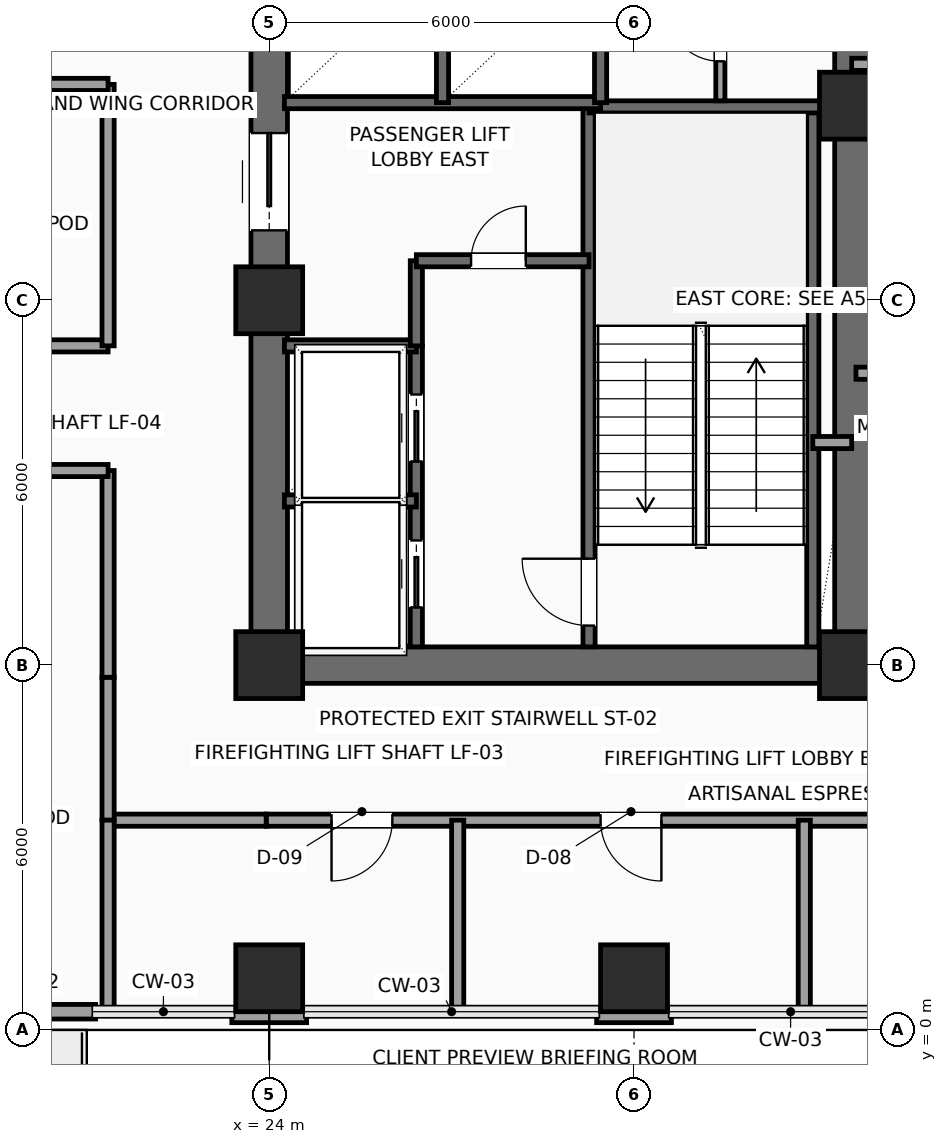
"""IFC4 building model, lengths in metres.
Left out: names, types, materials, properties, quantities, classifications, styles, units other than length and angle.
Written with IfcOpenShell. Run it as: python <this file> out.ifc"""

import sys

from ifc_helpers import new_model, si_unit, direction, frame, frame_2d, origin, origin_2d, place, context, subcontext, project, spatial, rectangle, extrude, element, fill, save


model = new_model("IFC4")
c1 = context("Model", 3, precision=1e-05, world=origin(), true_north=direction((0.0, 1.0)))
c2 = subcontext(c1, "Body", "Model", "MODEL_VIEW")
j1 = project(units=[si_unit("LENGTHUNIT", "METRE"), si_unit("PLANEANGLEUNIT", "RADIAN")], contexts=[c1])
p1 = place(None, origin())
s1 = spatial("IfcSite", under=j1, at=p1, CompositionType="ELEMENT")
p2 = place(p1, origin())
s2 = spatial("IfcBuilding", under=s1, at=p2, CompositionType="ELEMENT")
p3 = place(p2, frame((0.0, 0.0, 115.65)))
s3 = spatial("IfcBuildingStorey", under=s2, at=p3, CompositionType="ELEMENT", Elevation=115.65)
for number, where, z_axis, x_axis in (
    (1, (24.0, 6.0, 0.0), (0.0, 0.0, 1.0), (1.0, 0.0, 0.0)),
    (2, (24.0, 12.0, 0.0), (0.0, 0.0, 1.0), (1.0, 0.0, 0.0)),
    (3, (33.6, 6.0, 0.0), (0.0, 0.0, 1.0), (1.0, 0.0, 0.0)),
    (4, (33.6, 15.2, 0.0), (0.0, 0.0, 1.0), (1.0, 0.0, 0.0)),
    (5, (24.0, 0.85, 0.0), (0.0, 0.0, 1.0), (1.0, 0.0, 0.0)),
    (6, (30.0, 0.85, 0.0), (0.0, 0.0, 1.0), (1.0, 0.0, 0.0)),
):
    element("IfcColumn", number, at=place(p3, frame(where, z_axis=z_axis, x_axis=x_axis)), inside=s3, PredefinedType="COLUMN", context=c2, shape_type="SweptSolid", body=[
        extrude(rectangle(XDim=1.1, YDim=1.1, at=origin_2d()), origin(), (0.0, 0.0, 1.0), 3.75),
    ])
p4 = place(p3, frame((21.145, 0.3, 0.0), z_axis=(0.0, 0.0, 1.0), x_axis=(-1.0, 0.0, 0.0)))
e7 = element("IfcWall", 7, at=p4, inside=s3, PredefinedType="SOLIDWALL", context=c2, shape_type="SweptSolid", body=[
    extrude(rectangle(XDim=9.29, YDim=0.24, at=frame_2d((4.645, 0.0))), origin(), (0.0, 0.0, 1.0), 3.525),
])
p5 = place(p4, frame((3.945, 0.0, 0.0)))
e8 = element("IfcOpeningElement", 8, at=p5, cuts=e7, PredefinedType="OPENING", context=c2, shape_type="SweptSolid", body=[
    extrude(rectangle(XDim=1.05, YDim=2.2, at=frame_2d((0.525, 1.1))), frame((0.0, 0.13, 0.0), z_axis=(0.0, -1.0, 0.0), x_axis=(1.0, 0.0, 0.0)), (0.0, 0.0, 1.0), 0.26),
])
p6 = place(p4, frame((6.5, 0.0, 0.85)))
e9 = element("IfcOpeningElement", 9, at=p6, cuts=e7, PredefinedType="OPENING", context=c2, shape_type="SweptSolid", body=[
    extrude(rectangle(XDim=1.8, YDim=2.1, at=frame_2d((0.9, 1.05))), frame((0.0, 0.13, 0.0), z_axis=(0.0, -1.0, 0.0), x_axis=(1.0, 0.0, 0.0)), (0.0, 0.0, 1.0), 0.26),
])
for number, where, z_axis, x_axis in (
    (10, (30.615, 0.24, 0.0), (0.0, 0.0, 1.0), (-1.0, 0.0, 0.0)),
    (11, (24.615, 0.24, 0.0), (0.0, 0.0, 1.0), (-1.0, 0.0, 0.0)),
):
    element("IfcWall", number, at=place(p3, frame(where, z_axis=z_axis, x_axis=x_axis)), inside=s3, PredefinedType="SOLIDWALL", context=c2, shape_type="SweptSolid", body=[
        extrude(rectangle(XDim=1.23, YDim=0.24, at=frame_2d((0.615, 0.0))), origin(), (0.0, 0.0, 1.0), 3.525),
    ])
p7 = place(p3, frame((24.0, 6.0, 0.0), z_axis=(0.0, 0.0, 1.0), x_axis=(1.0, 0.0, 0.0)))
e12 = element("IfcWall", 12, at=p7, inside=s3, PredefinedType="SHEAR", context=c2, shape_type="SweptSolid", body=[
    extrude(rectangle(XDim=9.6, YDim=0.6, at=frame_2d((4.8, 0.0))), origin(), (0.0, 0.0, 1.0), 3.525),
])
p8 = place(p3, frame((24.0, 6.0, 0.0), z_axis=(0.0, 0.0, 1.0), x_axis=(0.0, 1.0, 0.0)))
e13 = element("IfcWall", 13, at=p8, inside=s3, PredefinedType="SHEAR", context=c2, shape_type="SweptSolid", body=[
    extrude(rectangle(XDim=12.0, YDim=0.6, at=frame_2d((6.0, 0.0))), origin(), (0.0, 0.0, 1.0), 3.525),
])
p9 = place(p8, frame((7.15, 0.0, 0.0)))
e14 = element("IfcOpeningElement", 14, at=p9, cuts=e13, PredefinedType="OPENING", context=c2, shape_type="SweptSolid", body=[
    extrude(rectangle(XDim=1.6, YDim=2.3, at=frame_2d((0.8, 1.15))), frame((0.0, 0.31, 0.0), z_axis=(0.0, -1.0, 0.0), x_axis=(1.0, 0.0, 0.0)), (0.0, 0.0, 1.0), 0.62),
])
p10 = place(p3, frame((33.6, 6.0, 0.0), z_axis=(0.0, 0.0, 1.0), x_axis=(0.0, 1.0, 0.0)))
e15 = element("IfcWall", 15, at=p10, inside=s3, PredefinedType="SHEAR", context=c2, shape_type="SweptSolid", body=[
    extrude(rectangle(XDim=12.0, YDim=0.6, at=frame_2d((6.0, 0.0))), origin(), (0.0, 0.0, 1.0), 3.525),
])
p11 = place(p10, frame((10.15, 0.0, 0.0)))
e16 = element("IfcOpeningElement", 16, at=p11, cuts=e15, PredefinedType="OPENING", context=c2, shape_type="SweptSolid", body=[
    extrude(rectangle(XDim=0.9, YDim=2.15, at=frame_2d((0.45, 1.075))), frame((0.0, 0.31, 0.0), z_axis=(0.0, -1.0, 0.0), x_axis=(1.0, 0.0, 0.0)), (0.0, 0.0, 1.0), 0.62),
])
p12 = place(p3, frame((29.26, 6.3, 0.0), z_axis=(0.0, 0.0, 1.0), x_axis=(0.0, 1.0, 0.0)))
e17 = element("IfcWall", 17, at=p12, inside=s3, PredefinedType="SHEAR", context=c2, shape_type="SweptSolid", body=[
    extrude(rectangle(XDim=8.88, YDim=0.2, at=frame_2d((4.44, 0.0))), origin(), (0.0, 0.0, 1.0), 3.525),
])
p13 = place(p12, frame((0.35, 0.0, 0.0)))
e18 = element("IfcOpeningElement", 18, at=p13, cuts=e17, PredefinedType="OPENING", context=c2, shape_type="SweptSolid", body=[
    extrude(rectangle(XDim=1.1, YDim=2.2, at=frame_2d((0.55, 1.1))), frame((0.0, 0.11, 0.0), z_axis=(0.0, -1.0, 0.0), x_axis=(1.0, 0.0, 0.0)), (0.0, 0.0, 1.0), 0.22),
])
p14 = place(p3, frame((32.94, 6.3, 0.0), z_axis=(0.0, 0.0, 1.0), x_axis=(0.0, 1.0, 0.0)))
e19 = element("IfcWall", 19, at=p14, inside=s3, PredefinedType="SHEAR", context=c2, shape_type="SweptSolid", body=[
    extrude(rectangle(XDim=8.88, YDim=0.2, at=frame_2d((4.44, 0.0))), origin(), (0.0, 0.0, 1.0), 3.525),
])
p15 = place(p3, frame((29.26, 15.18, 0.0), z_axis=(0.0, 0.0, 1.0), x_axis=(1.0, 0.0, 0.0)))
e20 = element("IfcWall", 20, at=p15, inside=s3, PredefinedType="SHEAR", context=c2, shape_type="SweptSolid", body=[
    extrude(rectangle(XDim=4.04, YDim=0.2, at=frame_2d((2.02, 0.0))), origin(), (0.0, 0.0, 1.0), 3.525),
])
p16 = place(p3, frame((26.42, 6.3, 0.0), z_axis=(0.0, 0.0, 1.0), x_axis=(0.0, 1.0, 0.0)))
e21 = element("IfcWall", 21, at=p16, inside=s3, PredefinedType="SHEAR", context=c2, shape_type="SweptSolid", body=[
    extrude(rectangle(XDim=4.95, YDim=0.2, at=frame_2d((2.475, 0.0))), origin(), (0.0, 0.0, 1.0), 3.525),
])
p17 = place(p16, frame((0.65, 0.0, 0.0)))
e22 = element("IfcOpeningElement", 22, at=p17, cuts=e21, PredefinedType="OPENING", context=c2, shape_type="SweptSolid", body=[
    extrude(rectangle(XDim=1.1, YDim=2.2, at=frame_2d((0.55, 1.1))), frame((0.0, 0.11, 0.0), z_axis=(0.0, -1.0, 0.0), x_axis=(1.0, 0.0, 0.0)), (0.0, 0.0, 1.0), 0.22),
])
p18 = place(p16, frame((3.05, 0.0, 0.0)))
e23 = element("IfcOpeningElement", 23, at=p18, cuts=e21, PredefinedType="OPENING", context=c2, shape_type="SweptSolid", body=[
    extrude(rectangle(XDim=1.1, YDim=2.2, at=frame_2d((0.55, 1.1))), frame((0.0, 0.11, 0.0), z_axis=(0.0, -1.0, 0.0), x_axis=(1.0, 0.0, 0.0)), (0.0, 0.0, 1.0), 0.22),
])
for number, where, z_axis, x_axis in (
    (24, (24.25, 8.7, 0.0), (0.0, 0.0, 1.0), (1.0, 0.0, 0.0)),
    (25, (24.25, 11.25, 0.0), (0.0, 0.0, 1.0), (1.0, 0.0, 0.0)),
):
    element("IfcWall", number, at=place(p3, frame(where, z_axis=z_axis, x_axis=x_axis)), inside=s3, PredefinedType="SHEAR", context=c2, shape_type="SweptSolid", body=[
        extrude(rectangle(XDim=2.17, YDim=0.2, at=frame_2d((1.085, 0.0))), origin(), (0.0, 0.0, 1.0), 3.525),
    ])
p19 = place(p3, frame((26.42, 11.25, 0.0), z_axis=(0.0, 0.0, 1.0), x_axis=(0.0, 1.0, 0.0)))
e26 = element("IfcWall", 26, at=p19, inside=s3, PredefinedType="SHEAR", context=c2, shape_type="SweptSolid", body=[
    extrude(rectangle(XDim=1.4, YDim=0.2, at=frame_2d((0.7, 0.0))), origin(), (0.0, 0.0, 1.0), 3.525),
])
p20 = place(p3, frame((26.42, 12.65, 0.0), z_axis=(0.0, 0.0, 1.0), x_axis=(1.0, 0.0, 0.0)))
e27 = element("IfcWall", 27, at=p20, inside=s3, PredefinedType="SHEAR", context=c2, shape_type="SweptSolid", body=[
    extrude(rectangle(XDim=2.84, YDim=0.2, at=frame_2d((1.42, 0.0))), origin(), (0.0, 0.0, 1.0), 3.525),
])
p21 = place(p20, frame((0.9, 0.0, 0.0)))
e28 = element("IfcOpeningElement", 28, at=p21, cuts=e27, PredefinedType="OPENING", context=c2, shape_type="SweptSolid", body=[
    extrude(rectangle(XDim=0.9, YDim=2.15, at=frame_2d((0.45, 1.075))), frame((0.0, 0.11, 0.0), z_axis=(0.0, -1.0, 0.0), x_axis=(1.0, 0.0, 0.0)), (0.0, 0.0, 1.0), 0.22),
])
p22 = place(p3, frame((32.94, 9.66, 0.0), z_axis=(0.0, 0.0, 1.0), x_axis=(1.0, 0.0, 0.0)))
e29 = element("IfcWall", 29, at=p22, inside=s3, PredefinedType="SOLIDWALL", context=c2, shape_type="SweptSolid", body=[
    extrude(rectangle(XDim=0.64, YDim=0.2, at=frame_2d((0.32, 0.0))), origin(), (0.0, 0.0, 1.0), 3.525),
])
p23 = place(p3, frame((24.25, 15.25, 0.0), z_axis=(0.0, 0.0, 1.0), x_axis=(1.0, 0.0, 0.0)))
e30 = element("IfcWall", 30, at=p23, inside=s3, PredefinedType="SHEAR", context=c2, shape_type="SweptSolid", body=[
    extrude(rectangle(XDim=5.2, YDim=0.2, at=frame_2d((2.6, 0.0))), origin(), (0.0, 0.0, 1.0), 3.525),
])
p24 = place(p3, frame((26.85, 15.25, 0.0), z_axis=(0.0, 0.0, 1.0), x_axis=(0.0, 1.0, 0.0)))
e31 = element("IfcWall", 31, at=p24, inside=s3, PredefinedType="SHEAR", context=c2, shape_type="SweptSolid", body=[
    extrude(rectangle(XDim=2.4, YDim=0.2, at=frame_2d((1.2, 0.0))), origin(), (0.0, 0.0, 1.0), 3.525),
])
p25 = place(p3, frame((29.45, 15.25, 0.0), z_axis=(0.0, 0.0, 1.0), x_axis=(0.0, 1.0, 0.0)))
e32 = element("IfcWall", 32, at=p25, inside=s3, PredefinedType="SHEAR", context=c2, shape_type="SweptSolid", body=[
    extrude(rectangle(XDim=2.45, YDim=0.2, at=frame_2d((1.225, 0.0))), origin(), (0.0, 0.0, 1.0), 3.525),
])
p26 = place(p3, frame((31.42, 15.28, 0.0), z_axis=(0.0, 0.0, 1.0), x_axis=(0.0, 1.0, 0.0)))
e33 = element("IfcWall", 33, at=p26, inside=s3, PredefinedType="PARTITIONING", context=c2, shape_type="SweptSolid", body=[
    extrude(rectangle(XDim=2.42, YDim=0.15, at=frame_2d((1.21, 0.0))), origin(), (0.0, 0.0, 1.0), 3.525),
])
p27 = place(p26, frame((0.65, 0.0, 0.0)))
e34 = element("IfcOpeningElement", 34, at=p27, cuts=e33, PredefinedType="OPENING", context=c2, shape_type="SweptSolid", body=[
    extrude(rectangle(XDim=0.9, YDim=2.15, at=frame_2d((0.45, 1.075))), frame((0.0, 0.085, 0.0), z_axis=(0.0, -1.0, 0.0), x_axis=(1.0, 0.0, 0.0)), (0.0, 0.0, 1.0), 0.17),
])
p28 = place(p3, frame((10.8, 11.25, 0.0), z_axis=(0.0, 0.0, 1.0), x_axis=(1.0, 0.0, 0.0)))
e35 = element("IfcWall", 35, at=p28, inside=s3, PredefinedType="SOLIDWALL", context=c2, shape_type="SweptSolid", body=[
    extrude(rectangle(XDim=10.55, YDim=0.2, at=frame_2d((5.275, 0.0))), origin(), (0.0, 0.0, 1.0), 3.525),
])
p29 = place(p28, frame((2.15, 0.0, 0.0)))
e36 = element("IfcOpeningElement", 36, at=p29, cuts=e35, PredefinedType="OPENING", context=c2, shape_type="SweptSolid", body=[
    extrude(rectangle(XDim=1.0, YDim=2.2, at=frame_2d((0.5, 1.1))), frame((0.0, 0.11, 0.0), z_axis=(0.0, -1.0, 0.0), x_axis=(1.0, 0.0, 0.0)), (0.0, 0.0, 1.0), 0.22),
])
p30 = place(p28, frame((7.68, 0.0, 0.0)))
e37 = element("IfcOpeningElement", 37, at=p30, cuts=e35, PredefinedType="OPENING", context=c2, shape_type="SweptSolid", body=[
    extrude(rectangle(XDim=0.9, YDim=2.1, at=frame_2d((0.45, 1.05))), frame((0.0, 0.11, 0.0), z_axis=(0.0, -1.0, 0.0), x_axis=(1.0, 0.0, 0.0)), (0.0, 0.0, 1.0), 0.22),
])
p31 = place(p3, frame((21.35, 11.25, 0.0), z_axis=(0.0, 0.0, 1.0), x_axis=(0.0, 1.0, 0.0)))
e38 = element("IfcWall", 38, at=p31, inside=s3, PredefinedType="SOLIDWALL", context=c2, shape_type="SweptSolid", body=[
    extrude(rectangle(XDim=4.3, YDim=0.2, at=frame_2d((2.15, 0.0))), origin(), (0.0, 0.0, 1.0), 3.525),
])
p32 = place(p3, frame((21.35, 15.55, 0.0), z_axis=(0.0, 0.0, 1.0), x_axis=(-1.0, 0.0, 0.0)))
e39 = element("IfcWall", 39, at=p32, inside=s3, PredefinedType="SOLIDWALL", context=c2, shape_type="SweptSolid", body=[
    extrude(rectangle(XDim=3.3, YDim=0.2, at=frame_2d((1.65, 0.0))), origin(), (0.0, 0.0, 1.0), 3.525),
])
p33 = place(p3, frame((36.15, 15.88, 0.0), z_axis=(0.0, 0.0, 1.0), x_axis=(-1.0, 0.0, 0.0)))
e40 = element("IfcWall", 40, at=p33, inside=s3, PredefinedType="SOLIDWALL", context=c2, shape_type="SweptSolid", body=[
    extrude(rectangle(XDim=2.57, YDim=0.2, at=frame_2d((1.285, 0.0))), origin(), (0.0, 0.0, 1.0), 3.525),
])
p34 = place(p3, frame((36.15, 3.45, 0.0), z_axis=(0.0, 0.0, 1.0), x_axis=(-1.0, 0.0, 0.0)))
e41 = element("IfcWall", 41, at=p34, inside=s3, PredefinedType="SOLIDWALL", context=c2, shape_type="SweptSolid", body=[
    extrude(rectangle(XDim=12.2, YDim=0.2, at=frame_2d((6.1, 0.0))), origin(), (0.0, 0.0, 1.0), 3.067),
])
p35 = place(p34, frame((10.125, 0.0, 0.0)))
e42 = element("IfcOpeningElement", 42, at=p35, cuts=e41, PredefinedType="OPENING", context=c2, shape_type="SweptSolid", body=[
    extrude(rectangle(XDim=1.0, YDim=2.2, at=frame_2d((0.5, 1.1))), frame((0.0, 0.11, 0.0), z_axis=(0.0, -1.0, 0.0), x_axis=(1.0, 0.0, 0.0)), (0.0, 0.0, 1.0), 0.22),
])
p36 = place(p34, frame((5.7, 0.0, 0.0)))
e43 = element("IfcOpeningElement", 43, at=p36, cuts=e41, PredefinedType="OPENING", context=c2, shape_type="SweptSolid", body=[
    extrude(rectangle(XDim=1.0, YDim=2.2, at=frame_2d((0.5, 1.1))), frame((0.0, 0.11, 0.0), z_axis=(0.0, -1.0, 0.0), x_axis=(1.0, 0.0, 0.0)), (0.0, 0.0, 1.0), 0.22),
])
p37 = place(p3, frame((23.95, 3.45, 0.0), z_axis=(0.0, 0.0, 1.0), x_axis=(-1.0, 0.0, 0.0)))
e44 = element("IfcWall", 44, at=p37, inside=s3, PredefinedType="SOLIDWALL", context=c2, shape_type="SweptSolid", body=[
    extrude(rectangle(XDim=2.6, YDim=0.2, at=frame_2d((1.3, 0.0))), origin(), (0.0, 0.0, 1.0), 3.067),
])
p38 = place(p3, frame((21.35, 3.45, 0.0), z_axis=(0.0, 0.0, 1.0), x_axis=(0.0, 1.0, 0.0)))
e45 = element("IfcWall", 45, at=p38, inside=s3, PredefinedType="SOLIDWALL", context=c2, shape_type="SweptSolid", body=[
    extrude(rectangle(XDim=2.35, YDim=0.2, at=frame_2d((1.175, 0.0))), origin(), (0.0, 0.0, 1.0), 3.525),
])
p39 = place(p3, frame((21.35, 5.8, 0.0), z_axis=(0.0, 0.0, 1.0), x_axis=(0.0, 1.0, 0.0)))
e46 = element("IfcWall", 46, at=p39, inside=s3, PredefinedType="SOLIDWALL", context=c2, shape_type="SweptSolid", body=[
    extrude(rectangle(XDim=3.4, YDim=0.2, at=frame_2d((1.7, 0.0))), origin(), (0.0, 0.0, 1.0), 3.525),
])
p40 = place(p3, frame((21.35, 9.2, 0.0), z_axis=(0.0, 0.0, 1.0), x_axis=(-1.0, 0.0, 0.0)))
e47 = element("IfcWall", 47, at=p40, inside=s3, PredefinedType="SOLIDWALL", context=c2, shape_type="SweptSolid", body=[
    extrude(rectangle(XDim=18.15, YDim=0.2, at=frame_2d((9.075, 0.0))), origin(), (0.0, 0.0, 1.0), 3.067),
])
p41 = place(p40, frame((16.65, 0.0, 0.0)))
e48 = element("IfcOpeningElement", 48, at=p41, cuts=e47, PredefinedType="OPENING", context=c2, shape_type="SweptSolid", body=[
    extrude(rectangle(XDim=1.0, YDim=2.2, at=frame_2d((0.5, 1.1))), frame((0.0, 0.11, 0.0), z_axis=(0.0, -1.0, 0.0), x_axis=(1.0, 0.0, 0.0)), (0.0, 0.0, 1.0), 0.22),
])
p42 = place(p40, frame((13.15, 0.0, 0.0)))
e49 = element("IfcOpeningElement", 49, at=p42, cuts=e47, PredefinedType="OPENING", context=c2, shape_type="SweptSolid", body=[
    extrude(rectangle(XDim=1.0, YDim=2.2, at=frame_2d((0.5, 1.1))), frame((0.0, 0.11, 0.0), z_axis=(0.0, -1.0, 0.0), x_axis=(1.0, 0.0, 0.0)), (0.0, 0.0, 1.0), 0.22),
])
p43 = place(p40, frame((8.15, 0.0, 0.0)))
e50 = element("IfcOpeningElement", 50, at=p43, cuts=e47, PredefinedType="OPENING", context=c2, shape_type="SweptSolid", body=[
    extrude(rectangle(XDim=1.0, YDim=2.2, at=frame_2d((0.5, 1.1))), frame((0.0, 0.11, 0.0), z_axis=(0.0, -1.0, 0.0), x_axis=(1.0, 0.0, 0.0)), (0.0, 0.0, 1.0), 0.22),
])
p44 = place(p40, frame((2.575, 0.0, 0.0)))
e51 = element("IfcOpeningElement", 51, at=p44, cuts=e47, PredefinedType="OPENING", context=c2, shape_type="SweptSolid", body=[
    extrude(rectangle(XDim=1.0, YDim=2.2, at=frame_2d((0.5, 1.1))), frame((0.0, 0.11, 0.0), z_axis=(0.0, -1.0, 0.0), x_axis=(1.0, 0.0, 0.0)), (0.0, 0.0, 1.0), 0.22),
])
for number, where, z_axis, x_axis in (
    (52, (21.35, 0.3, 0.0), (0.0, 0.0, 1.0), (0.0, 1.0, 0.0)),
    (53, (27.1, 0.3, 0.0), (0.0, 0.0, 1.0), (0.0, 1.0, 0.0)),
    (54, (32.8, 0.3, 0.0), (0.0, 0.0, 1.0), (0.0, 1.0, 0.0)),
):
    element("IfcWall", number, at=place(p3, frame(where, z_axis=z_axis, x_axis=x_axis)), inside=s3, PredefinedType="PARTITIONING", context=c2, shape_type="SweptSolid", body=[
        extrude(rectangle(XDim=3.15, YDim=0.2, at=frame_2d((1.575, 0.0))), origin(), (0.0, 0.0, 1.0), 3.525),
    ])
p45 = place(p3, frame((33.65, 5.8, 0.0), z_axis=(0.0, 0.0, 1.0), x_axis=(1.0, 0.0, 0.0)))
e55 = element("IfcWall", 55, at=p45, inside=s3, PredefinedType="PARTITIONING", context=c2, shape_type="SweptSolid", body=[
    extrude(rectangle(XDim=2.5, YDim=0.2, at=frame_2d((1.25, 0.0))), origin(), (0.0, 0.0, 1.0), 3.017),
])
p46 = place(p3, frame((33.65, 10.8, 0.0), z_axis=(0.0, 0.0, 1.0), x_axis=(1.0, 0.0, 0.0)))
e56 = element("IfcWall", 56, at=p46, inside=s3, PredefinedType="PARTITIONING", context=c2, shape_type="SweptSolid", body=[
    extrude(rectangle(XDim=2.5, YDim=0.2, at=frame_2d((1.25, 0.0))), origin(), (0.0, 0.0, 1.0), 3.525),
])
p47 = place(p9, origin())
e57 = element("IfcDoor", 57, at=p47, inside=s3, OperationType="DOUBLE_DOOR_SLIDING", PredefinedType="DOOR", context=c2, shape_type="SweptSolid", body=[
    extrude(rectangle(XDim=1.6, YDim=2.3, at=frame_2d((0.8, 1.15))), frame((0.0, 0.025, 0.0), z_axis=(0.0, -1.0, 0.0), x_axis=(1.0, 0.0, 0.0)), (0.0, 0.0, 1.0), 0.05),
])
fill(e14, e57)
p48 = place(p13, origin())
e58 = element("IfcDoor", 58, at=p48, inside=s3, OperationType="SINGLE_SWING_RIGHT", PredefinedType="DOOR", context=c2, shape_type="SweptSolid", body=[
    extrude(rectangle(XDim=1.1, YDim=2.2, at=frame_2d((0.55, 1.1))), frame((0.0, 0.025, 0.0), z_axis=(0.0, -1.0, 0.0), x_axis=(1.0, 0.0, 0.0)), (0.0, 0.0, 1.0), 0.05),
])
fill(e18, e58)
p49 = place(p17, origin())
e59 = element("IfcDoor", 59, at=p49, inside=s3, OperationType="SLIDING_TO_LEFT", PredefinedType="DOOR", context=c2, shape_type="SweptSolid", body=[
    extrude(rectangle(XDim=1.1, YDim=2.2, at=frame_2d((0.55, 1.1))), frame((0.0, 0.025, 0.0), z_axis=(0.0, -1.0, 0.0), x_axis=(1.0, 0.0, 0.0)), (0.0, 0.0, 1.0), 0.05),
])
fill(e22, e59)
p50 = place(p18, origin())
e60 = element("IfcDoor", 60, at=p50, inside=s3, OperationType="SLIDING_TO_LEFT", PredefinedType="DOOR", context=c2, shape_type="SweptSolid", body=[
    extrude(rectangle(XDim=1.1, YDim=2.2, at=frame_2d((0.55, 1.1))), frame((0.0, 0.025, 0.0), z_axis=(0.0, -1.0, 0.0), x_axis=(1.0, 0.0, 0.0)), (0.0, 0.0, 1.0), 0.05),
])
fill(e23, e60)
p51 = place(p21, origin())
e61 = element("IfcDoor", 61, at=p51, inside=s3, OperationType="SINGLE_SWING_RIGHT", PredefinedType="DOOR", context=c2, shape_type="SweptSolid", body=[
    extrude(rectangle(XDim=0.9, YDim=2.15, at=frame_2d((0.45, 1.075))), frame((0.0, 0.025, 0.0), z_axis=(0.0, -1.0, 0.0), x_axis=(1.0, 0.0, 0.0)), (0.0, 0.0, 1.0), 0.05),
])
fill(e28, e61)
p52 = place(p27, origin())
e62 = element("IfcDoor", 62, at=p52, inside=s3, OperationType="SINGLE_SWING_RIGHT", PredefinedType="DOOR", context=c2, shape_type="SweptSolid", body=[
    extrude(rectangle(XDim=0.9, YDim=2.15, at=frame_2d((0.45, 1.075))), frame((0.0, 0.025, 0.0), z_axis=(0.0, -1.0, 0.0), x_axis=(1.0, 0.0, 0.0)), (0.0, 0.0, 1.0), 0.05),
])
fill(e34, e62)
p53 = place(p35, origin())
e63 = element("IfcDoor", 63, at=p53, inside=s3, OperationType="SINGLE_SWING_RIGHT", PredefinedType="DOOR", context=c2, shape_type="SweptSolid", body=[
    extrude(rectangle(XDim=1.0, YDim=2.2, at=frame_2d((0.5, 1.1))), frame((0.0, 0.025, 0.0), z_axis=(0.0, -1.0, 0.0), x_axis=(1.0, 0.0, 0.0)), (0.0, 0.0, 1.0), 0.05),
])
fill(e42, e63)
p54 = place(p36, origin())
e64 = element("IfcDoor", 64, at=p54, inside=s3, OperationType="SINGLE_SWING_LEFT", PredefinedType="DOOR", context=c2, shape_type="SweptSolid", body=[
    extrude(rectangle(XDim=1.0, YDim=2.2, at=frame_2d((0.5, 1.1))), frame((0.0, 0.025, 0.0), z_axis=(0.0, -1.0, 0.0), x_axis=(1.0, 0.0, 0.0)), (0.0, 0.0, 1.0), 0.05),
])
fill(e43, e64)
save(model, sys.argv[1])
